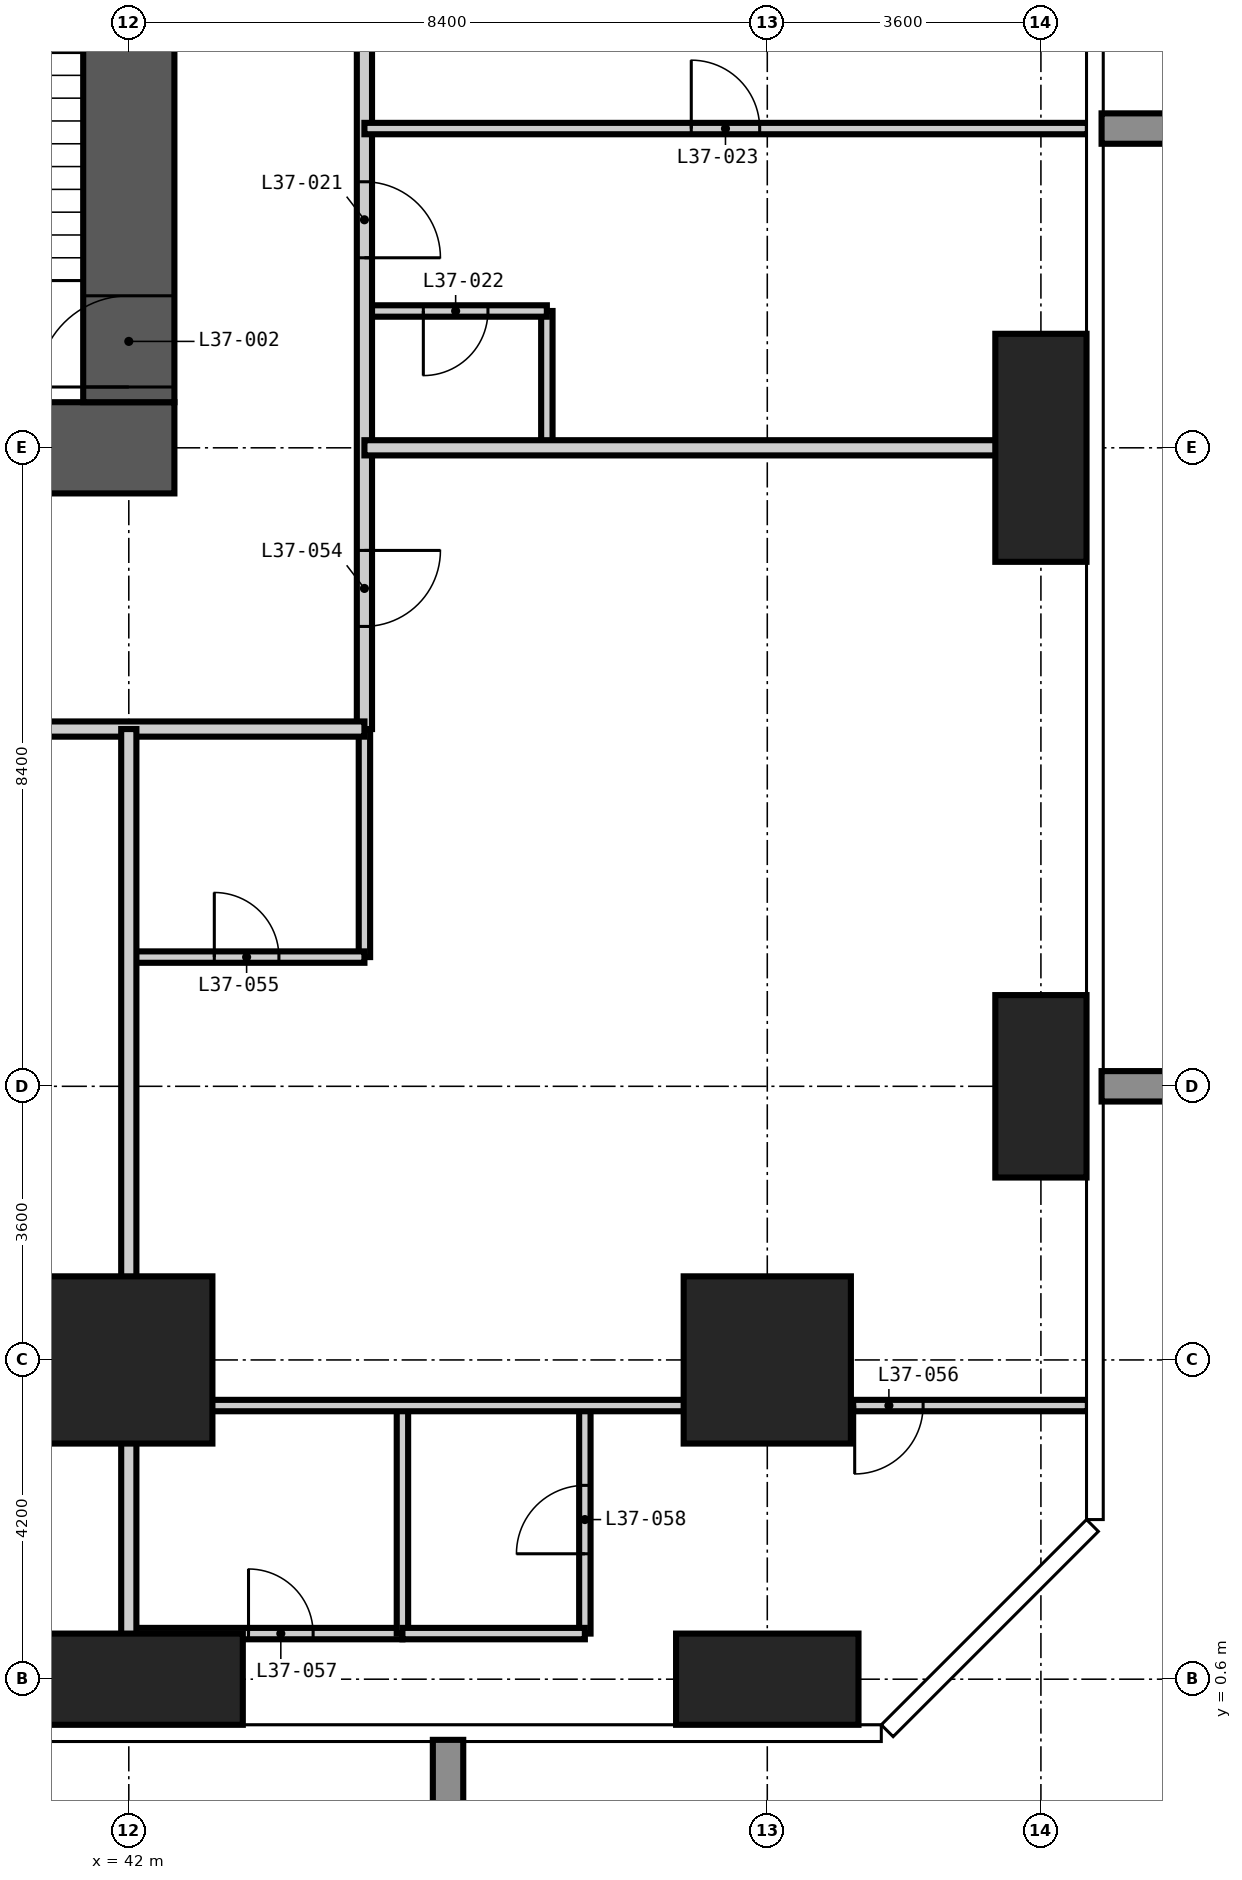
"""IFC4 building model, lengths in metres.
Left out: names, types, materials, properties, quantities, classifications, styles, units other than length and angle.
Written with IfcOpenShell. Run it as: python <this file> out.ifc"""

import sys

from ifc_helpers import new_model, si_unit, direction, frame, frame_2d, origin, origin_2d, place, context, subcontext, project, spatial, rectangle, extrude, element, fill, save


model = new_model("IFC4")
c1 = context("Model", 3, precision=1e-05, world=origin(), true_north=direction((0.0, 1.0)))
c2 = subcontext(c1, "Body", "Model", "MODEL_VIEW")
j1 = project(units=[si_unit("LENGTHUNIT", "METRE"), si_unit("PLANEANGLEUNIT", "RADIAN")], contexts=[c1])
p1 = place(None, origin())
s1 = spatial("IfcSite", under=j1, at=p1, CompositionType="ELEMENT")
p2 = place(p1, origin())
s2 = spatial("IfcBuilding", under=s1, at=p2, CompositionType="ELEMENT")
p3 = place(p2, frame((0.0, 0.0, 144.0)))
s3 = spatial("IfcBuildingStorey", under=s2, at=p3, CompositionType="ELEMENT", Elevation=144.0)
p4 = place(p3, frame((42.0, 0.6, -0.35), z_axis=(0.0, 0.0, 1.0), x_axis=(1.0, 0.0, 0.0)))
e1 = element("IfcColumn", 1, at=p4, inside=s3, PredefinedType="COLUMN", context=c2, shape_type="SweptSolid", body=[
    extrude(rectangle(XDim=3.0, YDim=1.2, at=origin_2d()), origin(), (0.0, 0.0, 1.0), 3.6),
])
p5 = place(p3, frame((42.0, 4.8, -0.35), z_axis=(0.0, 0.0, 1.0), x_axis=(1.0, 0.0, 0.0)))
e2 = element("IfcColumn", 2, at=p5, inside=s3, PredefinedType="COLUMN", context=c2, shape_type="SweptSolid", body=[
    extrude(rectangle(XDim=2.2, YDim=2.2, at=origin_2d()), origin(), (0.0, 0.0, 1.0), 3.6),
])
p6 = place(p3, frame((50.4, 0.6, -0.35), z_axis=(0.0, 0.0, 1.0), x_axis=(1.0, 0.0, 0.0)))
e3 = element("IfcColumn", 3, at=p6, inside=s3, PredefinedType="COLUMN", context=c2, shape_type="SweptSolid", body=[
    extrude(rectangle(XDim=2.4, YDim=1.2, at=origin_2d()), origin(), (0.0, 0.0, 1.0), 3.6),
])
p7 = place(p3, frame((50.4, 4.8, -0.35), z_axis=(0.0, 0.0, 1.0), x_axis=(1.0, 0.0, 0.0)))
e4 = element("IfcColumn", 4, at=p7, inside=s3, PredefinedType="COLUMN", context=c2, shape_type="SweptSolid", body=[
    extrude(rectangle(XDim=2.2, YDim=2.2, at=origin_2d()), origin(), (0.0, 0.0, 1.0), 3.6),
])
p8 = place(p3, frame((54.0, 8.4, -0.35), z_axis=(0.0, 0.0, 1.0), x_axis=(1.0, 0.0, 0.0)))
e5 = element("IfcColumn", 5, at=p8, inside=s3, PredefinedType="COLUMN", context=c2, shape_type="SweptSolid", body=[
    extrude(rectangle(XDim=1.2, YDim=2.4, at=origin_2d()), origin(), (0.0, 0.0, 1.0), 3.6),
])
p9 = place(p3, frame((54.0, 16.8, -0.35), z_axis=(0.0, 0.0, 1.0), x_axis=(1.0, 0.0, 0.0)))
e6 = element("IfcColumn", 6, at=p9, inside=s3, PredefinedType="COLUMN", context=c2, shape_type="SweptSolid", body=[
    extrude(rectangle(XDim=1.2, YDim=3.0, at=origin_2d()), origin(), (0.0, 0.0, 1.0), 3.6),
])
p10 = place(p3, frame((16.2, 16.8, -0.35), z_axis=(0.0, 0.0, 1.0), x_axis=(1.0, 0.0, 0.0)))
e7 = element("IfcWall", 7, at=p10, inside=s3, PredefinedType="SHEAR", context=c2, shape_type="SweptSolid", body=[
    extrude(rectangle(XDim=26.4, YDim=1.2, at=frame_2d((13.2, 0.0))), origin(), (0.0, 0.0, 1.0), 3.6),
])
p11 = place(p10, frame((12.7, 0.0, 0.35)))
e8 = element("IfcOpeningElement", 8, at=p11, cuts=e7, PredefinedType="OPENING", context=c2, shape_type="SweptSolid", body=[
    extrude(rectangle(XDim=1.0, YDim=2.1, at=frame_2d((0.5, 1.05))), frame((0.0, 0.61, 0.0), z_axis=(0.0, -1.0, 0.0), x_axis=(1.0, 0.0, 0.0)), (0.0, 0.0, 1.0), 1.22),
])
p12 = place(p10, frame((19.0, 0.0, 0.35)))
e9 = element("IfcOpeningElement", 9, at=p12, cuts=e7, PredefinedType="OPENING", context=c2, shape_type="SweptSolid", body=[
    extrude(rectangle(XDim=1.0, YDim=2.1, at=frame_2d((0.5, 1.05))), frame((0.0, 0.61, 0.0), z_axis=(0.0, -1.0, 0.0), x_axis=(1.0, 0.0, 0.0)), (0.0, 0.0, 1.0), 1.22),
])
p13 = place(p3, frame((42.0, 17.4, -0.35), z_axis=(0.0, 0.0, 1.0), x_axis=(0.0, 1.0, 0.0)))
e10 = element("IfcWall", 10, at=p13, inside=s3, PredefinedType="SHEAR", context=c2, shape_type="SweptSolid", body=[
    extrude(rectangle(XDim=24.0, YDim=1.2, at=frame_2d((12.0, 0.0))), origin(), (0.0, 0.0, 1.0), 3.6),
])
p14 = place(p13, frame((0.2, 0.0, 0.35)))
e11 = element("IfcOpeningElement", 11, at=p14, cuts=e10, PredefinedType="OPENING", context=c2, shape_type="SweptSolid", body=[
    extrude(rectangle(XDim=1.2, YDim=2.2, at=frame_2d((0.6, 1.1))), frame((0.0, 0.61, 0.0), z_axis=(0.0, -1.0, 0.0), x_axis=(1.0, 0.0, 0.0)), (0.0, 0.0, 1.0), 1.22),
])
p15 = place(p13, frame((11.1, 0.0, 0.35)))
e12 = element("IfcOpeningElement", 12, at=p15, cuts=e10, PredefinedType="OPENING", context=c2, shape_type="SweptSolid", body=[
    extrude(rectangle(XDim=1.8, YDim=2.2, at=frame_2d((0.9, 1.1))), frame((0.0, 0.61, 0.0), z_axis=(0.0, -1.0, 0.0), x_axis=(1.0, 0.0, 0.0)), (0.0, 0.0, 1.0), 1.22),
])
p16 = place(p13, frame((19.9, 0.0, 0.35)))
e13 = element("IfcOpeningElement", 13, at=p16, cuts=e10, PredefinedType="OPENING", context=c2, shape_type="SweptSolid", body=[
    extrude(rectangle(XDim=1.0, YDim=2.1, at=frame_2d((0.5, 1.05))), frame((0.0, 0.61, 0.0), z_axis=(0.0, -1.0, 0.0), x_axis=(1.0, 0.0, 0.0)), (0.0, 0.0, 1.0), 1.22),
])
p17 = place(p3, frame((45.1, 10.1, 0.0), z_axis=(0.0, 0.0, 1.0), x_axis=(0.0, 1.0, 0.0)))
e14 = element("IfcWall", 14, at=p17, inside=s3, PredefinedType="PARTITIONING", context=c2, shape_type="SweptSolid", body=[
    extrude(rectangle(XDim=3.0, YDim=0.15, at=frame_2d((1.5, 0.0))), origin(), (0.0, 0.0, 1.0), 3.25),
])
p18 = place(p3, frame((47.5, 16.8, 0.0), z_axis=(0.0, 0.0, 1.0), x_axis=(0.0, 1.0, 0.0)))
e15 = element("IfcWall", 15, at=p18, inside=s3, PredefinedType="PARTITIONING", context=c2, shape_type="SweptSolid", body=[
    extrude(rectangle(XDim=1.8, YDim=0.15, at=frame_2d((0.9, 0.0))), origin(), (0.0, 0.0, 1.0), 3.25),
])
p19 = place(p3, frame((42.0, 1.2, 0.0), z_axis=(0.0, 0.0, 1.0), x_axis=(1.0, 0.0, 0.0)))
e16 = element("IfcWall", 16, at=p19, inside=s3, PredefinedType="PARTITIONING", context=c2, shape_type="SweptSolid", body=[
    extrude(rectangle(XDim=3.6, YDim=0.15, at=frame_2d((1.8, 0.0))), origin(), (0.0, 0.0, 1.0), 3.25),
])
p20 = place(p19, frame((1.575, 0.0, 0.0)))
e17 = element("IfcOpeningElement", 17, at=p20, cuts=e16, PredefinedType="OPENING", context=c2, shape_type="SweptSolid", body=[
    extrude(rectangle(XDim=0.85, YDim=2.1, at=frame_2d((0.425, 1.05))), frame((0.0, 0.085, 0.0), z_axis=(0.0, -1.0, 0.0), x_axis=(1.0, 0.0, 0.0)), (0.0, 0.0, 1.0), 0.17),
])
p21 = place(p3, frame((42.0, 10.1, 0.0), z_axis=(0.0, 0.0, 1.0), x_axis=(1.0, 0.0, 0.0)))
e18 = element("IfcWall", 18, at=p21, inside=s3, PredefinedType="PARTITIONING", context=c2, shape_type="SweptSolid", body=[
    extrude(rectangle(XDim=3.1, YDim=0.15, at=frame_2d((1.55, 0.0))), origin(), (0.0, 0.0, 1.0), 3.25),
])
p22 = place(p21, frame((1.125, 0.0, 0.0)))
e19 = element("IfcOpeningElement", 19, at=p22, cuts=e18, PredefinedType="OPENING", context=c2, shape_type="SweptSolid", body=[
    extrude(rectangle(XDim=0.85, YDim=2.1, at=frame_2d((0.425, 1.05))), frame((0.0, 0.085, 0.0), z_axis=(0.0, -1.0, 0.0), x_axis=(1.0, 0.0, 0.0)), (0.0, 0.0, 1.0), 0.17),
])
p23 = place(p3, frame((45.1, 18.6, 0.0), z_axis=(0.0, 0.0, 1.0), x_axis=(1.0, 0.0, 0.0)))
e20 = element("IfcWall", 20, at=p23, inside=s3, PredefinedType="PARTITIONING", context=c2, shape_type="SweptSolid", body=[
    extrude(rectangle(XDim=2.4, YDim=0.15, at=frame_2d((1.2, 0.0))), origin(), (0.0, 0.0, 1.0), 3.25),
])
p24 = place(p23, frame((0.775, 0.0, 0.0)))
e21 = element("IfcOpeningElement", 21, at=p24, cuts=e20, PredefinedType="OPENING", context=c2, shape_type="SweptSolid", body=[
    extrude(rectangle(XDim=0.85, YDim=2.1, at=frame_2d((0.425, 1.05))), frame((0.0, 0.085, 0.0), z_axis=(0.0, -1.0, 0.0), x_axis=(1.0, 0.0, 0.0)), (0.0, 0.0, 1.0), 0.17),
])
p25 = place(p3, frame((45.1, 44.5, 0.0), z_axis=(0.0, 0.0, 1.0), x_axis=(0.0, -1.0, 0.0)))
e22 = element("IfcWall", 22, at=p25, inside=s3, PredefinedType="PARTITIONING", context=c2, shape_type="SweptSolid", body=[
    extrude(rectangle(XDim=31.4, YDim=0.2, at=frame_2d((15.7, 0.0))), origin(), (0.0, 0.0, 1.0), 3.25),
])
p26 = place(p25, frame((24.2, 0.0, 0.0)))
e23 = element("IfcOpeningElement", 23, at=p26, cuts=e22, PredefinedType="OPENING", context=c2, shape_type="SweptSolid", body=[
    extrude(rectangle(XDim=1.0, YDim=2.2, at=frame_2d((0.5, 1.1))), frame((0.0, 0.11, 0.0), z_axis=(0.0, -1.0, 0.0), x_axis=(1.0, 0.0, 0.0)), (0.0, 0.0, 1.0), 0.22),
])
p27 = place(p25, frame((13.4, 0.0, 0.0)))
e24 = element("IfcOpeningElement", 24, at=p27, cuts=e22, PredefinedType="OPENING", context=c2, shape_type="SweptSolid", body=[
    extrude(rectangle(XDim=1.0, YDim=2.2, at=frame_2d((0.5, 1.1))), frame((0.0, 0.11, 0.0), z_axis=(0.0, -1.0, 0.0), x_axis=(1.0, 0.0, 0.0)), (0.0, 0.0, 1.0), 0.22),
])
p28 = place(p25, frame((7.4, 0.0, 0.0)))
e25 = element("IfcOpeningElement", 25, at=p28, cuts=e22, PredefinedType="OPENING", context=c2, shape_type="SweptSolid", body=[
    extrude(rectangle(XDim=1.0, YDim=2.2, at=frame_2d((0.5, 1.1))), frame((0.0, 0.11, 0.0), z_axis=(0.0, -1.0, 0.0), x_axis=(1.0, 0.0, 0.0)), (0.0, 0.0, 1.0), 0.22),
])
p29 = place(p25, frame((29.05, 0.0, 0.0)))
e26 = element("IfcOpeningElement", 26, at=p29, cuts=e22, PredefinedType="OPENING", context=c2, shape_type="SweptSolid", body=[
    extrude(rectangle(XDim=1.0, YDim=2.2, at=frame_2d((0.5, 1.1))), frame((0.0, 0.11, 0.0), z_axis=(0.0, -1.0, 0.0), x_axis=(1.0, 0.0, 0.0)), (0.0, 0.0, 1.0), 0.22),
])
p30 = place(p25, frame((0.75, 0.0, 0.0)))
e27 = element("IfcOpeningElement", 27, at=p30, cuts=e22, PredefinedType="OPENING", context=c2, shape_type="SweptSolid", body=[
    extrude(rectangle(XDim=1.0, YDim=2.2, at=frame_2d((0.5, 1.1))), frame((0.0, 0.11, 0.0), z_axis=(0.0, -1.0, 0.0), x_axis=(1.0, 0.0, 0.0)), (0.0, 0.0, 1.0), 0.22),
])
p31 = place(p3, frame((45.1, 13.1, 0.0), z_axis=(0.0, 0.0, 1.0), x_axis=(-1.0, 0.0, 0.0)))
e28 = element("IfcWall", 28, at=p31, inside=s3, PredefinedType="PARTITIONING", context=c2, shape_type="SweptSolid", body=[
    extrude(rectangle(XDim=24.1, YDim=0.2, at=frame_2d((12.05, 0.0))), origin(), (0.0, 0.0, 1.0), 3.25),
])
p32 = place(p31, frame((21.5, 0.0, 0.0)))
e29 = element("IfcOpeningElement", 29, at=p32, cuts=e28, PredefinedType="OPENING", context=c2, shape_type="SweptSolid", body=[
    extrude(rectangle(XDim=1.0, YDim=2.2, at=frame_2d((0.5, 1.1))), frame((0.0, 0.11, 0.0), z_axis=(0.0, -1.0, 0.0), x_axis=(1.0, 0.0, 0.0)), (0.0, 0.0, 1.0), 0.22),
])
p33 = place(p31, frame((17.3, 0.0, 0.0)))
e30 = element("IfcOpeningElement", 30, at=p33, cuts=e28, PredefinedType="OPENING", context=c2, shape_type="SweptSolid", body=[
    extrude(rectangle(XDim=1.0, YDim=2.2, at=frame_2d((0.5, 1.1))), frame((0.0, 0.11, 0.0), z_axis=(0.0, -1.0, 0.0), x_axis=(1.0, 0.0, 0.0)), (0.0, 0.0, 1.0), 0.22),
])
p34 = place(p31, frame((11.0, 0.0, 0.0)))
e31 = element("IfcOpeningElement", 31, at=p34, cuts=e28, PredefinedType="OPENING", context=c2, shape_type="SweptSolid", body=[
    extrude(rectangle(XDim=1.0, YDim=2.2, at=frame_2d((0.5, 1.1))), frame((0.0, 0.11, 0.0), z_axis=(0.0, -1.0, 0.0), x_axis=(1.0, 0.0, 0.0)), (0.0, 0.0, 1.0), 0.22),
])
p35 = place(p31, frame((4.7, 0.0, 0.0)))
e32 = element("IfcOpeningElement", 32, at=p35, cuts=e28, PredefinedType="OPENING", context=c2, shape_type="SweptSolid", body=[
    extrude(rectangle(XDim=1.0, YDim=2.2, at=frame_2d((0.5, 1.1))), frame((0.0, 0.11, 0.0), z_axis=(0.0, -1.0, 0.0), x_axis=(1.0, 0.0, 0.0)), (0.0, 0.0, 1.0), 0.22),
])
p36 = place(p3, frame((42.0, -0.018, 0.0), z_axis=(0.0, 0.0, 1.0), x_axis=(0.0, 1.0, 0.0)))
e33 = element("IfcWall", 33, at=p36, inside=s3, PredefinedType="PARTITIONING", context=c2, shape_type="SweptSolid", body=[
    extrude(rectangle(XDim=13.118, YDim=0.2, at=frame_2d((6.559, 0.0))), origin(), (0.0, 0.0, 1.0), 3.25),
])
p37 = place(p3, frame((45.1, 16.8, 0.0), z_axis=(0.0, 0.0, 1.0), x_axis=(1.0, 0.0, 0.0)))
e34 = element("IfcWall", 34, at=p37, inside=s3, PredefinedType="PARTITIONING", context=c2, shape_type="SweptSolid", body=[
    extrude(rectangle(XDim=9.518, YDim=0.2, at=frame_2d((4.759, 0.0))), origin(), (0.0, 0.0, 1.0), 3.25),
])
p38 = place(p3, frame((45.6, 1.2, 0.0), z_axis=(0.0, 0.0, 1.0), x_axis=(0.0, 1.0, 0.0)))
e35 = element("IfcWall", 35, at=p38, inside=s3, PredefinedType="PARTITIONING", context=c2, shape_type="SweptSolid", body=[
    extrude(rectangle(XDim=3.0, YDim=0.15, at=frame_2d((1.5, 0.0))), origin(), (0.0, 0.0, 1.0), 3.25),
])
p39 = place(p3, frame((48.0, 1.2, 0.0), z_axis=(0.0, 0.0, 1.0), x_axis=(0.0, 1.0, 0.0)))
e36 = element("IfcWall", 36, at=p39, inside=s3, PredefinedType="PARTITIONING", context=c2, shape_type="SweptSolid", body=[
    extrude(rectangle(XDim=3.0, YDim=0.15, at=frame_2d((1.5, 0.0))), origin(), (0.0, 0.0, 1.0), 3.25),
])
p40 = place(p39, frame((1.05, 0.0, 0.0)))
e37 = element("IfcOpeningElement", 37, at=p40, cuts=e36, PredefinedType="OPENING", context=c2, shape_type="SweptSolid", body=[
    extrude(rectangle(XDim=0.9, YDim=2.1, at=frame_2d((0.45, 1.05))), frame((0.0, 0.085, 0.0), z_axis=(0.0, -1.0, 0.0), x_axis=(1.0, 0.0, 0.0)), (0.0, 0.0, 1.0), 0.17),
])
p41 = place(p3, frame((45.6, 1.2, 0.0), z_axis=(0.0, 0.0, 1.0), x_axis=(1.0, 0.0, 0.0)))
e38 = element("IfcWall", 38, at=p41, inside=s3, PredefinedType="PARTITIONING", context=c2, shape_type="SweptSolid", body=[
    extrude(rectangle(XDim=2.4, YDim=0.15, at=frame_2d((1.2, 0.0))), origin(), (0.0, 0.0, 1.0), 3.25),
])
p42 = place(p3, frame((42.0, 4.2, 0.0), z_axis=(0.0, 0.0, 1.0), x_axis=(1.0, 0.0, 0.0)))
e39 = element("IfcWall", 39, at=p42, inside=s3, PredefinedType="PARTITIONING", context=c2, shape_type="SweptSolid", body=[
    extrude(rectangle(XDim=12.618, YDim=0.15, at=frame_2d((6.309, 0.0))), origin(), (0.0, 0.0, 1.0), 3.25),
])
p43 = place(p42, frame((9.55, 0.0, 0.0)))
e40 = element("IfcOpeningElement", 40, at=p43, cuts=e39, PredefinedType="OPENING", context=c2, shape_type="SweptSolid", body=[
    extrude(rectangle(XDim=0.9, YDim=2.1, at=frame_2d((0.45, 1.05))), frame((0.0, 0.085, 0.0), z_axis=(0.0, -1.0, 0.0), x_axis=(1.0, 0.0, 0.0)), (0.0, 0.0, 1.0), 0.17),
])
p44 = place(p3, frame((45.1, 21.0, 0.0), z_axis=(0.0, 0.0, 1.0), x_axis=(1.0, 0.0, 0.0)))
e41 = element("IfcWall", 41, at=p44, inside=s3, PredefinedType="PARTITIONING", context=c2, shape_type="SweptSolid", body=[
    extrude(rectangle(XDim=9.518, YDim=0.15, at=frame_2d((4.759, 0.0))), origin(), (0.0, 0.0, 1.0), 3.25),
])
p45 = place(p44, frame((4.3, 0.0, 0.0)))
e42 = element("IfcOpeningElement", 42, at=p45, cuts=e41, PredefinedType="OPENING", context=c2, shape_type="SweptSolid", body=[
    extrude(rectangle(XDim=0.9, YDim=2.1, at=frame_2d((0.45, 1.05))), frame((0.0, 0.085, 0.0), z_axis=(0.0, -1.0, 0.0), x_axis=(1.0, 0.0, 0.0)), (0.0, 0.0, 1.0), 0.17),
])
p46 = place(p14, origin())
e43 = element("IfcDoor", 43, at=p46, inside=s3, OperationType="SINGLE_SWING_LEFT", PredefinedType="DOOR", context=c2, shape_type="SweptSolid", body=[
    extrude(rectangle(XDim=1.2, YDim=2.2, at=frame_2d((0.6, 1.1))), frame((0.0, 0.025, 0.0), z_axis=(0.0, -1.0, 0.0), x_axis=(1.0, 0.0, 0.0)), (0.0, 0.0, 1.0), 0.05),
])
fill(e11, e43)
p47 = place(p26, origin())
e44 = element("IfcDoor", 44, at=p47, inside=s3, OperationType="SINGLE_SWING_RIGHT", PredefinedType="DOOR", context=c2, shape_type="SweptSolid", body=[
    extrude(rectangle(XDim=1.0, YDim=2.2, at=frame_2d((0.5, 1.1))), frame((0.0, 0.025, 0.0), z_axis=(0.0, -1.0, 0.0), x_axis=(1.0, 0.0, 0.0)), (0.0, 0.0, 1.0), 0.05),
])
fill(e23, e44)
p48 = place(p24, frame((0.85, 0.0, 0.0), z_axis=(0.0, 0.0, 1.0), x_axis=(-1.0, 0.0, 0.0)))
e45 = element("IfcDoor", 45, at=p48, inside=s3, OperationType="SINGLE_SWING_RIGHT", PredefinedType="DOOR", context=c2, shape_type="SweptSolid", body=[
    extrude(rectangle(XDim=0.85, YDim=2.1, at=frame_2d((0.425, 1.05))), frame((0.0, 0.025, 0.0), z_axis=(0.0, -1.0, 0.0), x_axis=(1.0, 0.0, 0.0)), (0.0, 0.0, 1.0), 0.05),
])
fill(e21, e45)
p49 = place(p45, origin())
e46 = element("IfcDoor", 46, at=p49, inside=s3, OperationType="SINGLE_SWING_LEFT", PredefinedType="DOOR", context=c2, shape_type="SweptSolid", body=[
    extrude(rectangle(XDim=0.9, YDim=2.1, at=frame_2d((0.45, 1.05))), frame((0.0, 0.025, 0.0), z_axis=(0.0, -1.0, 0.0), x_axis=(1.0, 0.0, 0.0)), (0.0, 0.0, 1.0), 0.05),
])
fill(e42, e46)
p50 = place(p29, origin())
e47 = element("IfcDoor", 47, at=p50, inside=s3, OperationType="SINGLE_SWING_LEFT", PredefinedType="DOOR", context=c2, shape_type="SweptSolid", body=[
    extrude(rectangle(XDim=1.0, YDim=2.2, at=frame_2d((0.5, 1.1))), frame((0.0, 0.025, 0.0), z_axis=(0.0, -1.0, 0.0), x_axis=(1.0, 0.0, 0.0)), (0.0, 0.0, 1.0), 0.05),
])
fill(e26, e47)
p51 = place(p22, origin())
e48 = element("IfcDoor", 48, at=p51, inside=s3, OperationType="SINGLE_SWING_LEFT", PredefinedType="DOOR", context=c2, shape_type="SweptSolid", body=[
    extrude(rectangle(XDim=0.85, YDim=2.1, at=frame_2d((0.425, 1.05))), frame((0.0, 0.025, 0.0), z_axis=(0.0, -1.0, 0.0), x_axis=(1.0, 0.0, 0.0)), (0.0, 0.0, 1.0), 0.05),
])
fill(e19, e48)
p52 = place(p43, frame((0.9, 0.0, 0.0), z_axis=(0.0, 0.0, 1.0), x_axis=(-1.0, 0.0, 0.0)))
e49 = element("IfcDoor", 49, at=p52, inside=s3, OperationType="SINGLE_SWING_RIGHT", PredefinedType="DOOR", context=c2, shape_type="SweptSolid", body=[
    extrude(rectangle(XDim=0.9, YDim=2.1, at=frame_2d((0.45, 1.05))), frame((0.0, 0.025, 0.0), z_axis=(0.0, -1.0, 0.0), x_axis=(1.0, 0.0, 0.0)), (0.0, 0.0, 1.0), 0.05),
])
fill(e40, e49)
p53 = place(p20, origin())
e50 = element("IfcDoor", 50, at=p53, inside=s3, OperationType="SINGLE_SWING_LEFT", PredefinedType="DOOR", context=c2, shape_type="SweptSolid", body=[
    extrude(rectangle(XDim=0.85, YDim=2.1, at=frame_2d((0.425, 1.05))), frame((0.0, 0.025, 0.0), z_axis=(0.0, -1.0, 0.0), x_axis=(1.0, 0.0, 0.0)), (0.0, 0.0, 1.0), 0.05),
])
fill(e17, e50)
p54 = place(p40, origin())
e51 = element("IfcDoor", 51, at=p54, inside=s3, OperationType="SINGLE_SWING_LEFT", PredefinedType="DOOR", context=c2, shape_type="SweptSolid", body=[
    extrude(rectangle(XDim=0.9, YDim=2.1, at=frame_2d((0.45, 1.05))), frame((0.0, 0.025, 0.0), z_axis=(0.0, -1.0, 0.0), x_axis=(1.0, 0.0, 0.0)), (0.0, 0.0, 1.0), 0.05),
])
fill(e37, e51)
save(model, sys.argv[1])
